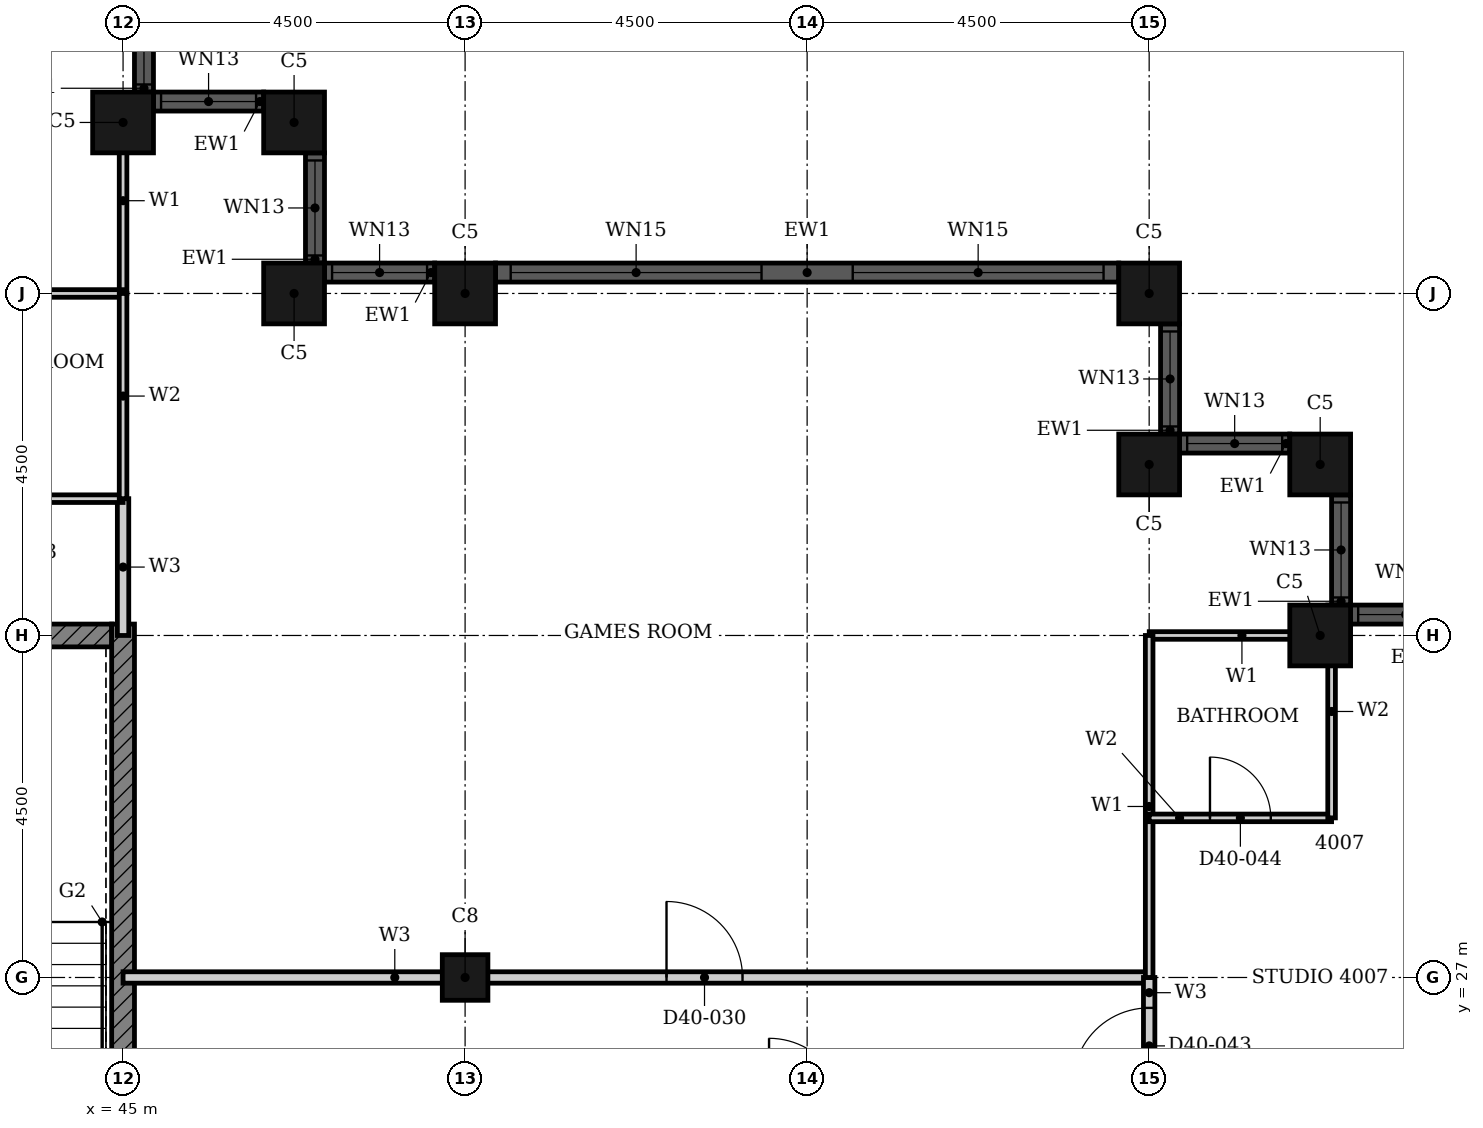
"""IFC4 building model, lengths in metres.
Left out: names, types, materials, properties, quantities, classifications, styles, units other than length and angle.
Written with IfcOpenShell. Run it as: python <this file> out.ifc"""

import sys

from ifc_helpers import new_model, si_unit, direction, frame, frame_2d, origin, origin_2d, place, context, subcontext, project, spatial, rectangle, hollow_rectangle, extrude, element, fill, save


model = new_model("IFC4")
c1 = context("Model", 3, precision=1e-05, world=origin(), true_north=direction((0.0, 1.0)))
c2 = subcontext(c1, "Body", "Model", "MODEL_VIEW")
j1 = project(units=[si_unit("LENGTHUNIT", "METRE"), si_unit("PLANEANGLEUNIT", "RADIAN")], contexts=[c1])
p1 = place(None, origin())
s1 = spatial("IfcSite", under=j1, at=p1, CompositionType="ELEMENT")
p2 = place(p1, origin())
s2 = spatial("IfcBuilding", under=s1, at=p2, CompositionType="ELEMENT")
p3 = place(p2, frame((0.0, 0.0, 161.7)))
s3 = spatial("IfcBuildingStorey", under=s2, at=p3, CompositionType="ELEMENT", Elevation=161.7)
for number, where, z_axis, x_axis in (
    (1, (60.75, 31.5, 0.0), (0.0, 0.0, 1.0), (1.0, 0.0, 0.0)),
    (2, (60.75, 33.75, 0.0), (0.0, 0.0, 1.0), (1.0, 0.0, 0.0)),
    (3, (58.5, 33.75, 0.0), (0.0, 0.0, 1.0), (1.0, 0.0, 0.0)),
    (4, (58.5, 36.0, 0.0), (0.0, 0.0, 1.0), (1.0, 0.0, 0.0)),
    (5, (49.5, 36.0, 0.0), (0.0, 0.0, 1.0), (1.0, 0.0, 0.0)),
    (6, (47.25, 36.0, 0.0), (0.0, 0.0, 1.0), (1.0, 0.0, 0.0)),
    (7, (47.25, 38.25, 0.0), (0.0, 0.0, 1.0), (1.0, 0.0, 0.0)),
    (8, (45.0, 38.25, 0.0), (0.0, 0.0, 1.0), (1.0, 0.0, 0.0)),
):
    element("IfcColumn", number, at=place(p3, frame(where, z_axis=z_axis, x_axis=x_axis)), inside=s3, PredefinedType="COLUMN", context=c2, shape_type="SweptSolid", body=[
        extrude(hollow_rectangle(XDim=0.8, YDim=0.8, WallThickness=0.025, at=origin_2d()), origin(), (0.0, 0.0, 1.0), 3.7),
    ])
p4 = place(p3, frame((49.5, 27.0, 0.0), z_axis=(0.0, 0.0, 1.0), x_axis=(1.0, 0.0, 0.0)))
e9 = element("IfcColumn", 9, at=p4, inside=s3, PredefinedType="COLUMN", context=c2, shape_type="SweptSolid", body=[
    extrude(hollow_rectangle(XDim=0.6, YDim=0.6, WallThickness=0.02, at=origin_2d()), origin(), (0.0, 0.0, 1.0), 3.7),
])
p5 = place(p3, frame((62.6, 31.775, 0.0), z_axis=(0.0, 0.0, 1.0), x_axis=(-1.0, 0.0, 0.0)))
e10 = element("IfcWall", 10, at=p5, inside=s3, PredefinedType="SOLIDWALL", context=c2, shape_type="SweptSolid", body=[
    extrude(rectangle(XDim=1.45, YDim=0.25, at=frame_2d((0.725, 0.0))), origin(), (0.0, 0.0, 1.0), 3.7),
])
p6 = place(p5, frame((0.1, 0.0, 0.9)))
e11 = element("IfcOpeningElement", 11, at=p6, cuts=e10, PredefinedType="OPENING", context=c2, shape_type="SweptSolid", body=[
    extrude(rectangle(XDim=1.25, YDim=1.85, at=frame_2d((0.625, 0.925))), frame((0.0, 0.135, 0.0), z_axis=(0.0, -1.0, 0.0), x_axis=(1.0, 0.0, 0.0)), (0.0, 0.0, 1.0), 0.27),
])
p7 = place(p3, frame((61.025, 31.9, 0.0), z_axis=(0.0, 0.0, 1.0), x_axis=(0.0, 1.0, 0.0)))
e12 = element("IfcWall", 12, at=p7, inside=s3, PredefinedType="SOLIDWALL", context=c2, shape_type="SweptSolid", body=[
    extrude(rectangle(XDim=1.45, YDim=0.25, at=frame_2d((0.725, 0.0))), origin(), (0.0, 0.0, 1.0), 3.7),
])
p8 = place(p7, frame((0.1, 0.0, 0.9)))
e13 = element("IfcOpeningElement", 13, at=p8, cuts=e12, PredefinedType="OPENING", context=c2, shape_type="SweptSolid", body=[
    extrude(rectangle(XDim=1.25, YDim=1.85, at=frame_2d((0.625, 0.925))), frame((0.0, 0.135, 0.0), z_axis=(0.0, -1.0, 0.0), x_axis=(1.0, 0.0, 0.0)), (0.0, 0.0, 1.0), 0.27),
])
p9 = place(p3, frame((60.35, 34.025, 0.0), z_axis=(0.0, 0.0, 1.0), x_axis=(-1.0, 0.0, 0.0)))
e14 = element("IfcWall", 14, at=p9, inside=s3, PredefinedType="SOLIDWALL", context=c2, shape_type="SweptSolid", body=[
    extrude(rectangle(XDim=1.45, YDim=0.25, at=frame_2d((0.725, 0.0))), origin(), (0.0, 0.0, 1.0), 3.7),
])
p10 = place(p9, frame((0.1, 0.0, 0.9)))
e15 = element("IfcOpeningElement", 15, at=p10, cuts=e14, PredefinedType="OPENING", context=c2, shape_type="SweptSolid", body=[
    extrude(rectangle(XDim=1.25, YDim=1.85, at=frame_2d((0.625, 0.925))), frame((0.0, 0.135, 0.0), z_axis=(0.0, -1.0, 0.0), x_axis=(1.0, 0.0, 0.0)), (0.0, 0.0, 1.0), 0.27),
])
p11 = place(p3, frame((58.775, 34.15, 0.0), z_axis=(0.0, 0.0, 1.0), x_axis=(0.0, 1.0, 0.0)))
e16 = element("IfcWall", 16, at=p11, inside=s3, PredefinedType="SOLIDWALL", context=c2, shape_type="SweptSolid", body=[
    extrude(rectangle(XDim=1.45, YDim=0.25, at=frame_2d((0.725, 0.0))), origin(), (0.0, 0.0, 1.0), 3.7),
])
p12 = place(p11, frame((0.1, 0.0, 0.9)))
e17 = element("IfcOpeningElement", 17, at=p12, cuts=e16, PredefinedType="OPENING", context=c2, shape_type="SweptSolid", body=[
    extrude(rectangle(XDim=1.25, YDim=1.85, at=frame_2d((0.625, 0.925))), frame((0.0, 0.135, 0.0), z_axis=(0.0, -1.0, 0.0), x_axis=(1.0, 0.0, 0.0)), (0.0, 0.0, 1.0), 0.27),
])
p13 = place(p3, frame((58.1, 36.275, 0.0), z_axis=(0.0, 0.0, 1.0), x_axis=(-1.0, 0.0, 0.0)))
e18 = element("IfcWall", 18, at=p13, inside=s3, PredefinedType="SOLIDWALL", context=c2, shape_type="SweptSolid", body=[
    extrude(rectangle(XDim=8.2, YDim=0.25, at=frame_2d((4.1, 0.0))), origin(), (0.0, 0.0, 1.0), 3.7),
])
p14 = place(p13, frame((0.2, 0.0, 0.45)))
e19 = element("IfcOpeningElement", 19, at=p14, cuts=e18, PredefinedType="OPENING", context=c2, shape_type="SweptSolid", body=[
    extrude(rectangle(XDim=3.3, YDim=2.3, at=frame_2d((1.65, 1.15))), frame((0.0, 0.135, 0.0), z_axis=(0.0, -1.0, 0.0), x_axis=(1.0, 0.0, 0.0)), (0.0, 0.0, 1.0), 0.27),
])
p15 = place(p13, frame((4.7, 0.0, 0.45)))
e20 = element("IfcOpeningElement", 20, at=p15, cuts=e18, PredefinedType="OPENING", context=c2, shape_type="SweptSolid", body=[
    extrude(rectangle(XDim=3.3, YDim=2.3, at=frame_2d((1.65, 1.15))), frame((0.0, 0.135, 0.0), z_axis=(0.0, -1.0, 0.0), x_axis=(1.0, 0.0, 0.0)), (0.0, 0.0, 1.0), 0.27),
])
p16 = place(p3, frame((49.1, 36.275, 0.0), z_axis=(0.0, 0.0, 1.0), x_axis=(-1.0, 0.0, 0.0)))
e21 = element("IfcWall", 21, at=p16, inside=s3, PredefinedType="SOLIDWALL", context=c2, shape_type="SweptSolid", body=[
    extrude(rectangle(XDim=1.45, YDim=0.25, at=frame_2d((0.725, 0.0))), origin(), (0.0, 0.0, 1.0), 3.7),
])
p17 = place(p16, frame((0.1, 0.0, 0.9)))
e22 = element("IfcOpeningElement", 22, at=p17, cuts=e21, PredefinedType="OPENING", context=c2, shape_type="SweptSolid", body=[
    extrude(rectangle(XDim=1.25, YDim=1.85, at=frame_2d((0.625, 0.925))), frame((0.0, 0.135, 0.0), z_axis=(0.0, -1.0, 0.0), x_axis=(1.0, 0.0, 0.0)), (0.0, 0.0, 1.0), 0.27),
])
p18 = place(p3, frame((47.525, 36.4, 0.0), z_axis=(0.0, 0.0, 1.0), x_axis=(0.0, 1.0, 0.0)))
e23 = element("IfcWall", 23, at=p18, inside=s3, PredefinedType="SOLIDWALL", context=c2, shape_type="SweptSolid", body=[
    extrude(rectangle(XDim=1.45, YDim=0.25, at=frame_2d((0.725, 0.0))), origin(), (0.0, 0.0, 1.0), 3.7),
])
p19 = place(p18, frame((0.1, 0.0, 0.9)))
e24 = element("IfcOpeningElement", 24, at=p19, cuts=e23, PredefinedType="OPENING", context=c2, shape_type="SweptSolid", body=[
    extrude(rectangle(XDim=1.25, YDim=1.85, at=frame_2d((0.625, 0.925))), frame((0.0, 0.135, 0.0), z_axis=(0.0, -1.0, 0.0), x_axis=(1.0, 0.0, 0.0)), (0.0, 0.0, 1.0), 0.27),
])
p20 = place(p3, frame((46.85, 38.525, 0.0), z_axis=(0.0, 0.0, 1.0), x_axis=(-1.0, 0.0, 0.0)))
e25 = element("IfcWall", 25, at=p20, inside=s3, PredefinedType="SOLIDWALL", context=c2, shape_type="SweptSolid", body=[
    extrude(rectangle(XDim=1.45, YDim=0.25, at=frame_2d((0.725, 0.0))), origin(), (0.0, 0.0, 1.0), 3.7),
])
p21 = place(p20, frame((0.1, 0.0, 0.9)))
e26 = element("IfcOpeningElement", 26, at=p21, cuts=e25, PredefinedType="OPENING", context=c2, shape_type="SweptSolid", body=[
    extrude(rectangle(XDim=1.25, YDim=1.85, at=frame_2d((0.625, 0.925))), frame((0.0, 0.135, 0.0), z_axis=(0.0, -1.0, 0.0), x_axis=(1.0, 0.0, 0.0)), (0.0, 0.0, 1.0), 0.27),
])
p22 = place(p3, frame((45.275, 38.65, 0.0), z_axis=(0.0, 0.0, 1.0), x_axis=(0.0, 1.0, 0.0)))
e27 = element("IfcWall", 27, at=p22, inside=s3, PredefinedType="SOLIDWALL", context=c2, shape_type="SweptSolid", body=[
    extrude(rectangle(XDim=1.45, YDim=0.25, at=frame_2d((0.725, 0.0))), origin(), (0.0, 0.0, 1.0), 3.7),
])
p23 = place(p22, frame((0.1, 0.0, 0.9)))
e28 = element("IfcOpeningElement", 28, at=p23, cuts=e27, PredefinedType="OPENING", context=c2, shape_type="SweptSolid", body=[
    extrude(rectangle(XDim=1.25, YDim=1.85, at=frame_2d((0.625, 0.925))), frame((0.0, 0.135, 0.0), z_axis=(0.0, -1.0, 0.0), x_axis=(1.0, 0.0, 0.0)), (0.0, 0.0, 1.0), 0.27),
])
p24 = place(p3, frame((40.625, 31.5, 0.0), z_axis=(0.0, 0.0, 1.0), x_axis=(1.0, 0.0, 0.0)))
e29 = element("IfcWall", 29, at=p24, inside=s3, PredefinedType="SHEAR", context=c2, shape_type="SweptSolid", body=[
    extrude(rectangle(XDim=4.225, YDim=0.3, at=frame_2d((2.113, 0.0))), origin(), (0.0, 0.0, 1.0), 3.4),
])
p25 = place(p3, frame((45.0, 22.35, 0.0), z_axis=(0.0, 0.0, 1.0), x_axis=(0.0, 1.0, 0.0)))
e30 = element("IfcWall", 30, at=p25, inside=s3, PredefinedType="SHEAR", context=c2, shape_type="SweptSolid", body=[
    extrude(rectangle(XDim=9.3, YDim=0.3, at=frame_2d((4.65, 0.0))), origin(), (0.0, 0.0, 1.0), 3.4),
])
p26 = place(p3, frame((45.0, 27.0, 0.0), z_axis=(0.0, 0.0, 1.0), x_axis=(1.0, 0.0, 0.0)))
e31 = element("IfcWall", 31, at=p26, inside=s3, PredefinedType="PARTITIONING", context=c2, shape_type="SweptSolid", body=[
    extrude(rectangle(XDim=13.5, YDim=0.15, at=frame_2d((6.75, 0.0))), origin(), (0.0, 0.0, 1.0), 2.68),
])
p27 = place(p26, frame((7.15, 0.0, 0.0)))
e32 = element("IfcOpeningElement", 32, at=p27, cuts=e31, PredefinedType="OPENING", context=c2, shape_type="SweptSolid", body=[
    extrude(rectangle(XDim=1.0, YDim=2.1, at=frame_2d((0.5, 1.05))), frame((0.0, 0.085, 0.0), z_axis=(0.0, -1.0, 0.0), x_axis=(1.0, 0.0, 0.0)), (0.0, 0.0, 1.0), 0.17),
])
p28 = place(p3, frame((45.0, 31.5, 0.0), z_axis=(0.0, 0.0, 1.0), x_axis=(0.0, 1.0, 0.0)))
e33 = element("IfcWall", 33, at=p28, inside=s3, PredefinedType="PARTITIONING", context=c2, shape_type="SweptSolid", body=[
    extrude(rectangle(XDim=1.8, YDim=0.15, at=frame_2d((0.9, 0.0))), origin(), (0.0, 0.0, 1.0), 3.4),
])
p29 = place(p3, frame((58.5, 25.2, 0.0), z_axis=(0.0, 0.0, 1.0), x_axis=(0.0, 1.0, 0.0)))
e34 = element("IfcWall", 34, at=p29, inside=s3, PredefinedType="PARTITIONING", context=c2, shape_type="SweptSolid", body=[
    extrude(rectangle(XDim=1.8, YDim=0.15, at=frame_2d((0.9, 0.0))), origin(), (0.0, 0.0, 1.0), 3.4),
])
p30 = place(p29, frame((0.4, 0.0, 0.0)))
e35 = element("IfcOpeningElement", 35, at=p30, cuts=e34, PredefinedType="OPENING", context=c2, shape_type="SweptSolid", body=[
    extrude(rectangle(XDim=1.0, YDim=2.2, at=frame_2d((0.5, 1.1))), frame((0.0, 0.085, 0.0), z_axis=(0.0, -1.0, 0.0), x_axis=(1.0, 0.0, 0.0)), (0.0, 0.0, 1.0), 0.17),
])
p31 = place(p3, frame((58.501, 31.5, 0.0), z_axis=(0.0, 0.0, 1.0), x_axis=(1.0, 0.0, 0.0)))
e36 = element("IfcWall", 36, at=p31, inside=s3, PredefinedType="PARTITIONING", context=c2, shape_type="SweptSolid", body=[
    extrude(rectangle(XDim=2.439, YDim=0.1, at=frame_2d((1.219, 0.0))), origin(), (0.0, 0.0, 1.0), 2.68),
])
p32 = place(p3, frame((45.0, 36.001, 0.0), z_axis=(0.0, 0.0, 1.0), x_axis=(0.0, 1.0, 0.0)))
e37 = element("IfcWall", 37, at=p32, inside=s3, PredefinedType="PARTITIONING", context=c2, shape_type="SweptSolid", body=[
    extrude(rectangle(XDim=2.439, YDim=0.1, at=frame_2d((1.219, 0.0))), origin(), (0.0, 0.0, 1.0), 3.4),
])
p33 = place(p3, frame((58.5, 27.0, 0.0), z_axis=(0.0, 0.0, 1.0), x_axis=(0.0, 1.0, 0.0)))
e38 = element("IfcWall", 38, at=p33, inside=s3, PredefinedType="PARTITIONING", context=c2, shape_type="SweptSolid", body=[
    extrude(rectangle(XDim=4.5, YDim=0.1, at=frame_2d((2.25, 0.0))), origin(), (0.0, 0.0, 1.0), 3.4),
])
p34 = place(p3, frame((58.5, 29.1, 0.0), z_axis=(0.0, 0.0, 1.0), x_axis=(1.0, 0.0, 0.0)))
e39 = element("IfcWall", 39, at=p34, inside=s3, PredefinedType="PARTITIONING", context=c2, shape_type="SweptSolid", body=[
    extrude(rectangle(XDim=2.4, YDim=0.1, at=frame_2d((1.2, 0.0))), origin(), (0.0, 0.0, 1.0), 3.4),
])
p35 = place(p34, frame((0.8, 0.0, 0.0)))
e40 = element("IfcOpeningElement", 40, at=p35, cuts=e39, PredefinedType="OPENING", context=c2, shape_type="SweptSolid", body=[
    extrude(rectangle(XDim=0.8, YDim=2.1, at=frame_2d((0.4, 1.05))), frame((0.0, 0.06, 0.0), z_axis=(0.0, -1.0, 0.0), x_axis=(1.0, 0.0, 0.0)), (0.0, 0.0, 1.0), 0.12),
])
for number, where, z_axis, x_axis in (
    (41, (42.6, 33.3, 0.0), (0.0, 0.0, 1.0), (1.0, 0.0, 0.0)),
    (42, (42.6, 36.0, 0.0), (0.0, 0.0, 1.0), (1.0, 0.0, 0.0)),
):
    element("IfcWall", number, at=place(p3, frame(where, z_axis=z_axis, x_axis=x_axis)), inside=s3, PredefinedType="PARTITIONING", context=c2, shape_type="SweptSolid", body=[
        extrude(rectangle(XDim=2.4, YDim=0.1, at=frame_2d((1.2, 0.0))), origin(), (0.0, 0.0, 1.0), 3.4),
    ])
p36 = place(p3, frame((45.0, 33.3, 0.0), z_axis=(0.0, 0.0, 1.0), x_axis=(0.0, 1.0, 0.0)))
e43 = element("IfcWall", 43, at=p36, inside=s3, PredefinedType="PARTITIONING", context=c2, shape_type="SweptSolid", body=[
    extrude(rectangle(XDim=2.7, YDim=0.1, at=frame_2d((1.35, 0.0))), origin(), (0.0, 0.0, 1.0), 3.4),
])
p37 = place(p3, frame((60.9, 29.1, 0.0), z_axis=(0.0, 0.0, 1.0), x_axis=(0.0, 1.0, 0.0)))
e44 = element("IfcWall", 44, at=p37, inside=s3, PredefinedType="PARTITIONING", context=c2, shape_type="SweptSolid", body=[
    extrude(rectangle(XDim=2.8, YDim=0.1, at=frame_2d((1.4, 0.0))), origin(), (0.0, 0.0, 1.0), 3.4),
])
p38 = place(p6, origin())
e45 = element("IfcWindow", 45, at=p38, inside=s3, PartitioningType="SINGLE_PANEL", PredefinedType="WINDOW", context=c2, shape_type="SweptSolid", body=[
    extrude(rectangle(XDim=1.25, YDim=1.85, at=frame_2d((0.625, 0.925))), frame((0.0, 0.03, 0.0), z_axis=(0.0, -1.0, 0.0), x_axis=(1.0, 0.0, 0.0)), (0.0, 0.0, 1.0), 0.06),
])
fill(e11, e45)
p39 = place(p8, origin())
e46 = element("IfcWindow", 46, at=p39, inside=s3, PartitioningType="SINGLE_PANEL", PredefinedType="WINDOW", context=c2, shape_type="SweptSolid", body=[
    extrude(rectangle(XDim=1.25, YDim=1.85, at=frame_2d((0.625, 0.925))), frame((0.0, 0.03, 0.0), z_axis=(0.0, -1.0, 0.0), x_axis=(1.0, 0.0, 0.0)), (0.0, 0.0, 1.0), 0.06),
])
fill(e13, e46)
p40 = place(p10, origin())
e47 = element("IfcWindow", 47, at=p40, inside=s3, PartitioningType="SINGLE_PANEL", PredefinedType="WINDOW", context=c2, shape_type="SweptSolid", body=[
    extrude(rectangle(XDim=1.25, YDim=1.85, at=frame_2d((0.625, 0.925))), frame((0.0, 0.03, 0.0), z_axis=(0.0, -1.0, 0.0), x_axis=(1.0, 0.0, 0.0)), (0.0, 0.0, 1.0), 0.06),
])
fill(e15, e47)
p41 = place(p12, origin())
e48 = element("IfcWindow", 48, at=p41, inside=s3, PartitioningType="SINGLE_PANEL", PredefinedType="WINDOW", context=c2, shape_type="SweptSolid", body=[
    extrude(rectangle(XDim=1.25, YDim=1.85, at=frame_2d((0.625, 0.925))), frame((0.0, 0.03, 0.0), z_axis=(0.0, -1.0, 0.0), x_axis=(1.0, 0.0, 0.0)), (0.0, 0.0, 1.0), 0.06),
])
fill(e17, e48)
p42 = place(p14, origin())
e49 = element("IfcWindow", 49, at=p42, inside=s3, PartitioningType="SINGLE_PANEL", PredefinedType="WINDOW", context=c2, shape_type="SweptSolid", body=[
    extrude(rectangle(XDim=3.3, YDim=2.3, at=frame_2d((1.65, 1.15))), frame((0.0, 0.03, 0.0), z_axis=(0.0, -1.0, 0.0), x_axis=(1.0, 0.0, 0.0)), (0.0, 0.0, 1.0), 0.06),
])
fill(e19, e49)
p43 = place(p15, origin())
e50 = element("IfcWindow", 50, at=p43, inside=s3, PartitioningType="SINGLE_PANEL", PredefinedType="WINDOW", context=c2, shape_type="SweptSolid", body=[
    extrude(rectangle(XDim=3.3, YDim=2.3, at=frame_2d((1.65, 1.15))), frame((0.0, 0.03, 0.0), z_axis=(0.0, -1.0, 0.0), x_axis=(1.0, 0.0, 0.0)), (0.0, 0.0, 1.0), 0.06),
])
fill(e20, e50)
p44 = place(p17, origin())
e51 = element("IfcWindow", 51, at=p44, inside=s3, PartitioningType="SINGLE_PANEL", PredefinedType="WINDOW", context=c2, shape_type="SweptSolid", body=[
    extrude(rectangle(XDim=1.25, YDim=1.85, at=frame_2d((0.625, 0.925))), frame((0.0, 0.03, 0.0), z_axis=(0.0, -1.0, 0.0), x_axis=(1.0, 0.0, 0.0)), (0.0, 0.0, 1.0), 0.06),
])
fill(e22, e51)
p45 = place(p19, origin())
e52 = element("IfcWindow", 52, at=p45, inside=s3, PartitioningType="SINGLE_PANEL", PredefinedType="WINDOW", context=c2, shape_type="SweptSolid", body=[
    extrude(rectangle(XDim=1.25, YDim=1.85, at=frame_2d((0.625, 0.925))), frame((0.0, 0.03, 0.0), z_axis=(0.0, -1.0, 0.0), x_axis=(1.0, 0.0, 0.0)), (0.0, 0.0, 1.0), 0.06),
])
fill(e24, e52)
p46 = place(p21, origin())
e53 = element("IfcWindow", 53, at=p46, inside=s3, PartitioningType="SINGLE_PANEL", PredefinedType="WINDOW", context=c2, shape_type="SweptSolid", body=[
    extrude(rectangle(XDim=1.25, YDim=1.85, at=frame_2d((0.625, 0.925))), frame((0.0, 0.03, 0.0), z_axis=(0.0, -1.0, 0.0), x_axis=(1.0, 0.0, 0.0)), (0.0, 0.0, 1.0), 0.06),
])
fill(e26, e53)
p47 = place(p23, origin())
e54 = element("IfcWindow", 54, at=p47, inside=s3, PartitioningType="SINGLE_PANEL", PredefinedType="WINDOW", context=c2, shape_type="SweptSolid", body=[
    extrude(rectangle(XDim=1.25, YDim=1.85, at=frame_2d((0.625, 0.925))), frame((0.0, 0.03, 0.0), z_axis=(0.0, -1.0, 0.0), x_axis=(1.0, 0.0, 0.0)), (0.0, 0.0, 1.0), 0.06),
])
fill(e28, e54)
p48 = place(p27, origin())
e55 = element("IfcDoor", 55, at=p48, inside=s3, OperationType="SINGLE_SWING_RIGHT", PredefinedType="DOOR", context=c2, shape_type="SweptSolid", body=[
    extrude(rectangle(XDim=1.0, YDim=2.1, at=frame_2d((0.5, 1.05))), frame((0.0, 0.025, 0.0), z_axis=(0.0, -1.0, 0.0), x_axis=(1.0, 0.0, 0.0)), (0.0, 0.0, 1.0), 0.05),
])
fill(e32, e55)
p49 = place(p30, origin())
e56 = element("IfcDoor", 56, at=p49, inside=s3, OperationType="SINGLE_SWING_RIGHT", PredefinedType="DOOR", context=c2, shape_type="SweptSolid", body=[
    extrude(rectangle(XDim=1.0, YDim=2.2, at=frame_2d((0.5, 1.1))), frame((0.0, 0.025, 0.0), z_axis=(0.0, -1.0, 0.0), x_axis=(1.0, 0.0, 0.0)), (0.0, 0.0, 1.0), 0.05),
])
fill(e35, e56)
p50 = place(p35, origin())
e57 = element("IfcDoor", 57, at=p50, inside=s3, OperationType="SINGLE_SWING_RIGHT", PredefinedType="DOOR", context=c2, shape_type="SweptSolid", body=[
    extrude(rectangle(XDim=0.8, YDim=2.1, at=frame_2d((0.4, 1.05))), frame((0.0, 0.025, 0.0), z_axis=(0.0, -1.0, 0.0), x_axis=(1.0, 0.0, 0.0)), (0.0, 0.0, 1.0), 0.05),
])
fill(e40, e57)
save(model, sys.argv[1])
